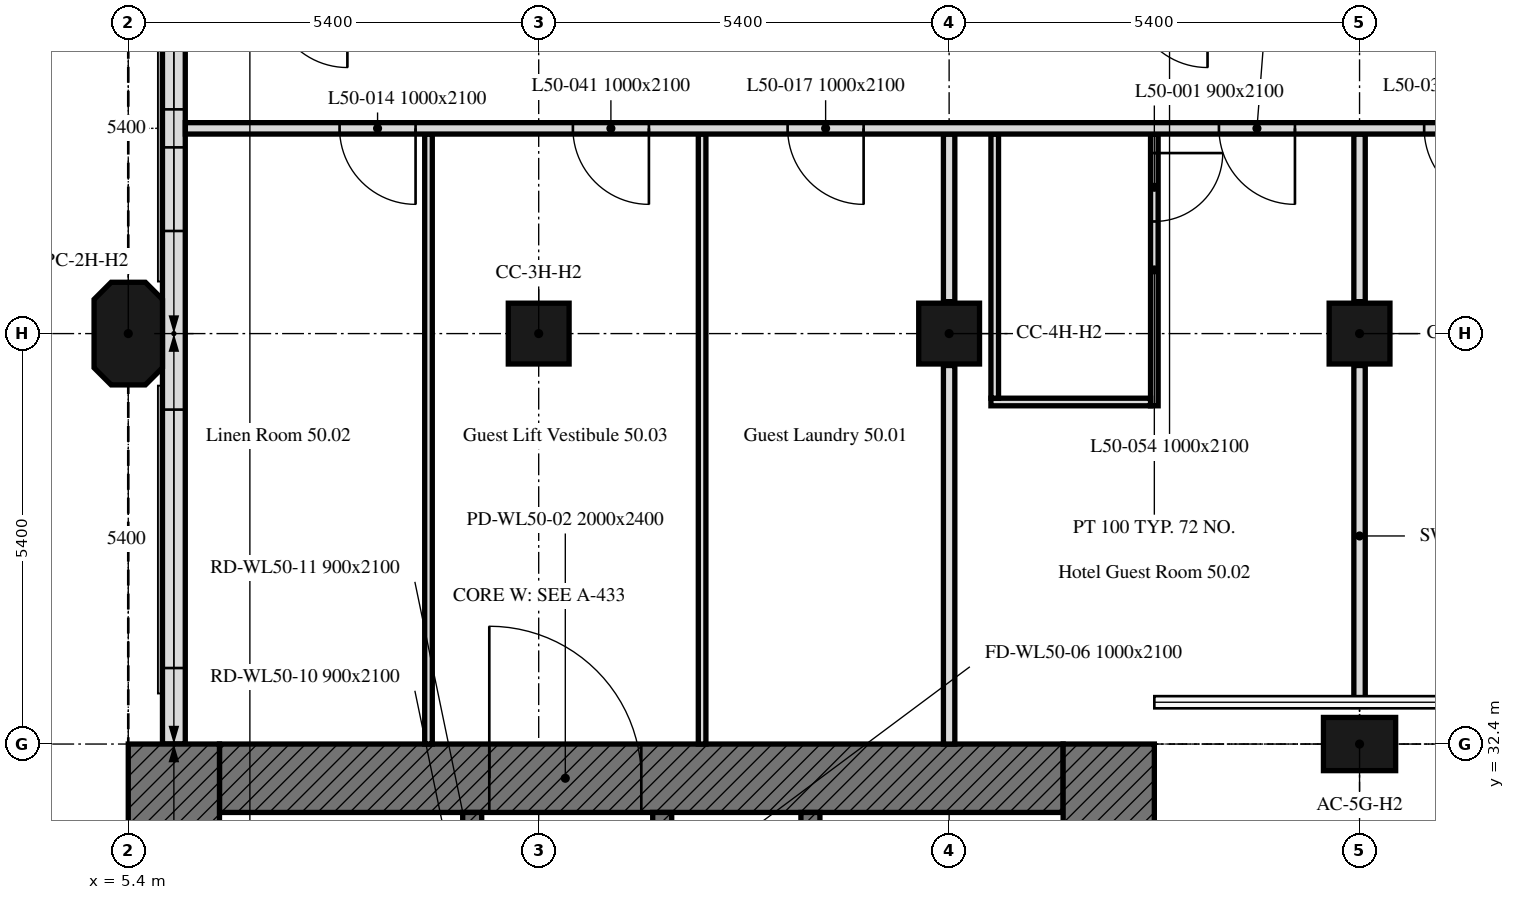
"""IFC4 building model, lengths in metres.
Left out: names, types, materials, properties, quantities, classifications, styles, units other than length and angle.
Written with IfcOpenShell. Run it as: python <this file> out.ifc"""

import sys

from ifc_helpers import new_model, si_unit, direction, frame, frame_2d, origin, origin_2d, place, context, subcontext, project, spatial, polyline, rectangle, outline, extrude, element, fill, save


model = new_model("IFC4")
c1 = context("Model", 3, precision=1e-05, world=origin(), true_north=direction((0.0, 1.0)))
c2 = subcontext(c1, "Body", "Model", "MODEL_VIEW")
j1 = project(units=[si_unit("LENGTHUNIT", "METRE"), si_unit("PLANEANGLEUNIT", "RADIAN")], contexts=[c1])
p1 = place(None, origin())
s1 = spatial("IfcSite", under=j1, at=p1, CompositionType="ELEMENT")
p2 = place(p1, origin())
s2 = spatial("IfcBuilding", under=s1, at=p2, CompositionType="ELEMENT")
p3 = place(p2, frame((0.0, 0.0, 203.8)))
s3 = spatial("IfcBuildingStorey", under=s2, at=p3, CompositionType="ELEMENT", Elevation=203.8)
p4 = place(p3, frame((21.6, 32.4, 0.0), z_axis=(0.0, 0.0, 1.0), x_axis=(1.0, 0.0, 0.0)))
e1 = element("IfcColumn", 1, at=p4, inside=s3, PredefinedType="COLUMN", context=c2, shape_type="SweptSolid", body=[
    extrude(rectangle(XDim=0.95, YDim=0.7, at=origin_2d()), origin(), (0.0, 0.0, 1.0), 3.0),
])
p5 = place(p3, frame((5.4, 37.8, 0.0), z_axis=(0.0, 0.0, 1.0), x_axis=(0.0, 1.0, 0.0)))
e2 = element("IfcColumn", 2, at=p5, inside=s3, PredefinedType="COLUMN", context=c2, shape_type="SweptSolid", body=[
    extrude(outline(polyline([(-0.45, -0.45), (0.45, -0.45), (0.675, -0.225), (0.675, 0.225), (0.45, 0.45), (-0.45, 0.45), (-0.675, 0.225), (-0.675, -0.225), (-0.45, -0.45)])), origin(), (0.0, 0.0, 1.0), 3.0),
])
for number, where, z_axis, x_axis in (
    (3, (10.8, 37.8, 0.0), (0.0, 0.0, 1.0), (1.0, 0.0, 0.0)),
    (4, (16.2, 37.8, 0.0), (0.0, 0.0, 1.0), (1.0, 0.0, 0.0)),
    (5, (21.6, 37.8, 0.0), (0.0, 0.0, 1.0), (1.0, 0.0, 0.0)),
):
    element("IfcColumn", number, at=place(p3, frame(where, z_axis=z_axis, x_axis=x_axis)), inside=s3, PredefinedType="COLUMN", context=c2, shape_type="SweptSolid", body=[
        extrude(rectangle(XDim=0.8, YDim=0.8, at=origin_2d()), origin(), (0.0, 0.0, 1.0), 3.0),
    ])
p6 = place(p3, frame((6.0, 43.014, 0.0), z_axis=(0.0, 0.0, 1.0), x_axis=(0.0, -1.0, 0.0)))
e6 = element("IfcWall", 6, at=p6, inside=s3, PredefinedType="SOLIDWALL", context=c2, shape_type="SweptSolid", body=[
    extrude(rectangle(XDim=10.614, YDim=0.3, at=frame_2d((5.307, 0.0))), origin(), (0.0, 0.0, 1.0), 3.0),
])
p7 = place(p6, frame((1.164, 0.0, 0.9)))
e7 = element("IfcOpeningElement", 7, at=p7, cuts=e6, PredefinedType="OPENING", context=c2, shape_type="SweptSolid", body=[
    extrude(rectangle(XDim=1.1, YDim=1.7, at=frame_2d((0.55, 0.85))), frame((0.0, 0.16, 0.0), z_axis=(0.0, -1.0, 0.0), x_axis=(1.0, 0.0, 0.0)), (0.0, 0.0, 1.0), 0.32),
])
p8 = place(p6, frame((2.764, 0.0, 0.9)))
e8 = element("IfcOpeningElement", 8, at=p8, cuts=e6, PredefinedType="OPENING", context=c2, shape_type="SweptSolid", body=[
    extrude(rectangle(XDim=1.1, YDim=1.7, at=frame_2d((0.55, 0.85))), frame((0.0, 0.16, 0.0), z_axis=(0.0, -1.0, 0.0), x_axis=(1.0, 0.0, 0.0)), (0.0, 0.0, 1.0), 0.32),
])
p9 = place(p6, frame((6.214, 0.0, 0.9)))
e9 = element("IfcOpeningElement", 9, at=p9, cuts=e6, PredefinedType="OPENING", context=c2, shape_type="SweptSolid", body=[
    extrude(rectangle(XDim=3.4, YDim=1.7, at=frame_2d((1.7, 0.85))), frame((0.0, 0.16, 0.0), z_axis=(0.0, -1.0, 0.0), x_axis=(1.0, 0.0, 0.0)), (0.0, 0.0, 1.0), 0.32),
])
p10 = place(p3, frame((6.6, 31.95, 0.0), z_axis=(0.0, 0.0, 1.0), x_axis=(1.0, 0.0, 0.0)))
e10 = element("IfcWall", 10, at=p10, inside=s3, PredefinedType="SOLIDWALL", context=c2, shape_type="SweptSolid", body=[
    extrude(rectangle(XDim=11.1, YDim=0.9, at=frame_2d((5.55, 0.0))), origin(), (0.0, 0.0, 1.0), 3.0),
])
p11 = place(p10, frame((3.55, 0.0, 0.0)))
e11 = element("IfcOpeningElement", 11, at=p11, cuts=e10, PredefinedType="OPENING", context=c2, shape_type="SweptSolid", body=[
    extrude(rectangle(XDim=2.0, YDim=2.4, at=frame_2d((1.0, 1.2))), frame((0.0, 0.45, 0.0), z_axis=(0.0, -1.0, 0.0), x_axis=(1.0, 0.0, 0.0)), (0.0, 0.0, 1.0), 0.9),
])
for number, where, z_axis, x_axis in (
    (12, (6.0, 16.2, 0.0), (0.0, 0.0, 1.0), (0.0, 1.0, 0.0)),
    (13, (18.3, 32.4, 0.0), (0.0, 0.0, 1.0), (0.0, -1.0, 0.0)),
):
    element("IfcWall", number, at=place(p3, frame(where, z_axis=z_axis, x_axis=x_axis)), inside=s3, PredefinedType="SOLIDWALL", context=c2, shape_type="SweptSolid", body=[
        extrude(rectangle(XDim=16.2, YDim=1.2, at=frame_2d((8.1, 0.0))), origin(), (0.0, 0.0, 1.0), 3.0),
    ])
p12 = place(p3, frame((9.925, 17.1, 0.0), z_axis=(0.0, 0.0, 1.0), x_axis=(0.0, 1.0, 0.0)))
e14 = element("IfcWall", 14, at=p12, inside=s3, PredefinedType="SOLIDWALL", context=c2, shape_type="SweptSolid", body=[
    extrude(rectangle(XDim=14.4, YDim=0.25, at=frame_2d((7.2, 0.0))), origin(), (0.0, 0.0, 1.0), 3.0),
])
p13 = place(p12, frame((4.6, 0.0, 0.0)))
e15 = element("IfcOpeningElement", 15, at=p13, cuts=e14, PredefinedType="OPENING", context=c2, shape_type="SweptSolid", body=[
    extrude(rectangle(XDim=1.0, YDim=2.1, at=frame_2d((0.5, 1.05))), frame((0.0, 0.125, 0.0), z_axis=(0.0, -1.0, 0.0), x_axis=(1.0, 0.0, 0.0)), (0.0, 0.0, 1.0), 0.25),
])
p14 = place(p12, frame((7.062, 0.0, 0.0)))
e16 = element("IfcOpeningElement", 16, at=p14, cuts=e14, PredefinedType="OPENING", context=c2, shape_type="SweptSolid", body=[
    extrude(rectangle(XDim=1.2, YDim=2.1, at=frame_2d((0.6, 1.05))), frame((0.0, 0.125, 0.0), z_axis=(0.0, -1.0, 0.0), x_axis=(1.0, 0.0, 0.0)), (0.0, 0.0, 1.0), 0.25),
])
p15 = place(p12, frame((9.979, 0.0, 0.0)))
e17 = element("IfcOpeningElement", 17, at=p15, cuts=e14, PredefinedType="OPENING", context=c2, shape_type="SweptSolid", body=[
    extrude(rectangle(XDim=0.9, YDim=2.1, at=frame_2d((0.45, 1.05))), frame((0.0, 0.125, 0.0), z_axis=(0.0, -1.0, 0.0), x_axis=(1.0, 0.0, 0.0)), (0.0, 0.0, 1.0), 0.25),
])
p16 = place(p12, frame((11.92, 0.0, 0.0)))
e18 = element("IfcOpeningElement", 18, at=p16, cuts=e14, PredefinedType="OPENING", context=c2, shape_type="SweptSolid", body=[
    extrude(rectangle(XDim=0.9, YDim=2.1, at=frame_2d((0.45, 1.05))), frame((0.0, 0.125, 0.0), z_axis=(0.0, -1.0, 0.0), x_axis=(1.0, 0.0, 0.0)), (0.0, 0.0, 1.0), 0.25),
])
p17 = place(p12, frame((13.354, 0.0, 0.0)))
e19 = element("IfcOpeningElement", 19, at=p17, cuts=e14, PredefinedType="OPENING", context=c2, shape_type="SweptSolid", body=[
    extrude(rectangle(XDim=0.9, YDim=2.1, at=frame_2d((0.45, 1.05))), frame((0.0, 0.125, 0.0), z_axis=(0.0, -1.0, 0.0), x_axis=(1.0, 0.0, 0.0)), (0.0, 0.0, 1.0), 0.25),
])
p18 = place(p3, frame((14.375, 17.1, 0.0), z_axis=(0.0, 0.0, 1.0), x_axis=(0.0, 1.0, 0.0)))
e20 = element("IfcWall", 20, at=p18, inside=s3, PredefinedType="SOLIDWALL", context=c2, shape_type="SweptSolid", body=[
    extrude(rectangle(XDim=14.4, YDim=0.25, at=frame_2d((7.2, 0.0))), origin(), (0.0, 0.0, 1.0), 3.0),
])
p19 = place(p18, frame((13.15, 0.0, 0.0)))
e21 = element("IfcOpeningElement", 21, at=p19, cuts=e20, PredefinedType="OPENING", context=c2, shape_type="SweptSolid", body=[
    extrude(rectangle(XDim=1.0, YDim=2.1, at=frame_2d((0.5, 1.05))), frame((0.0, 0.125, 0.0), z_axis=(0.0, -1.0, 0.0), x_axis=(1.0, 0.0, 0.0)), (0.0, 0.0, 1.0), 0.25),
])
p20 = place(p18, frame((0.6, 0.0, 0.0)))
e22 = element("IfcOpeningElement", 22, at=p20, cuts=e20, PredefinedType="OPENING", context=c2, shape_type="SweptSolid", body=[
    extrude(rectangle(XDim=1.1, YDim=2.1, at=frame_2d((0.55, 1.05))), frame((0.0, 0.125, 0.0), z_axis=(0.0, -1.0, 0.0), x_axis=(1.0, 0.0, 0.0)), (0.0, 0.0, 1.0), 0.25),
])
p21 = place(p18, frame((3.25, 0.0, 0.0)))
e23 = element("IfcOpeningElement", 23, at=p21, cuts=e20, PredefinedType="OPENING", context=c2, shape_type="SweptSolid", body=[
    extrude(rectangle(XDim=0.9, YDim=2.1, at=frame_2d((0.45, 1.05))), frame((0.0, 0.125, 0.0), z_axis=(0.0, -1.0, 0.0), x_axis=(1.0, 0.0, 0.0)), (0.0, 0.0, 1.0), 0.25),
])
p22 = place(p3, frame((12.425, 29.4, 0.0), z_axis=(0.0, 0.0, 1.0), x_axis=(0.0, 1.0, 0.0)))
e24 = element("IfcWall", 24, at=p22, inside=s3, PredefinedType="SOLIDWALL", context=c2, shape_type="SweptSolid", body=[
    extrude(rectangle(XDim=2.1, YDim=0.25, at=frame_2d((1.05, 0.0))), origin(), (0.0, 0.0, 1.0), 3.0),
])
p23 = place(p22, frame((0.5, 0.0, 0.0)))
e25 = element("IfcOpeningElement", 25, at=p23, cuts=e24, PredefinedType="OPENING", context=c2, shape_type="SweptSolid", body=[
    extrude(rectangle(XDim=1.0, YDim=2.1, at=frame_2d((0.5, 1.05))), frame((0.0, 0.125, 0.0), z_axis=(0.0, -1.0, 0.0), x_axis=(1.0, 0.0, 0.0)), (0.0, 0.0, 1.0), 0.25),
])
p24 = place(p3, frame((21.6, 32.895, 0.0), z_axis=(0.0, 0.0, 1.0), x_axis=(0.0, 1.0, 0.0)))
e26 = element("IfcWall", 26, at=p24, inside=s3, PredefinedType="PARTITIONING", context=c2, shape_type="SweptSolid", body=[
    extrude(rectangle(XDim=4.485, YDim=0.15, at=frame_2d((2.242, 0.0))), origin(), (0.0, 0.0, 1.0), 2.4),
])
p25 = place(p3, frame((21.6, 38.22, 0.0), z_axis=(0.0, 0.0, 1.0), x_axis=(0.0, 1.0, 0.0)))
e27 = element("IfcWall", 27, at=p25, inside=s3, PredefinedType="PARTITIONING", context=c2, shape_type="SweptSolid", body=[
    extrude(rectangle(XDim=2.205, YDim=0.15, at=frame_2d((1.103, 0.0))), origin(), (0.0, 0.0, 1.0), 2.4),
])
p26 = place(p3, frame((18.9, 40.425, 0.0), z_axis=(0.0, 0.0, 1.0), x_axis=(0.0, -1.0, 0.0)))
e28 = element("IfcWall", 28, at=p26, inside=s3, PredefinedType="PARTITIONING", context=c2, shape_type="SweptSolid", body=[
    extrude(rectangle(XDim=3.575, YDim=0.1, at=frame_2d((1.788, 0.0))), origin(), (0.0, 0.0, 1.0), 3.0),
])
p27 = place(p26, frame((0.25, 0.0, 0.0)))
e29 = element("IfcOpeningElement", 29, at=p27, cuts=e28, PredefinedType="OPENING", context=c2, shape_type="SweptSolid", body=[
    extrude(rectangle(XDim=0.9, YDim=2.1, at=frame_2d((0.45, 1.05))), frame((0.0, 0.05, 0.0), z_axis=(0.0, -1.0, 0.0), x_axis=(1.0, 0.0, 0.0)), (0.0, 0.0, 1.0), 0.1),
])
p28 = place(p3, frame((18.85, 36.9, 0.0), z_axis=(0.0, 0.0, 1.0), x_axis=(-1.0, 0.0, 0.0)))
e30 = element("IfcWall", 30, at=p28, inside=s3, PredefinedType="PARTITIONING", context=c2, shape_type="SweptSolid", body=[
    extrude(rectangle(XDim=2.1, YDim=0.1, at=frame_2d((1.05, 0.0))), origin(), (0.0, 0.0, 1.0), 3.0),
])
p29 = place(p3, frame((16.8, 36.95, 0.0), z_axis=(0.0, 0.0, 1.0), x_axis=(0.0, 1.0, 0.0)))
e31 = element("IfcWall", 31, at=p29, inside=s3, PredefinedType="PARTITIONING", context=c2, shape_type="SweptSolid", body=[
    extrude(rectangle(XDim=3.475, YDim=0.1, at=frame_2d((1.738, 0.0))), origin(), (0.0, 0.0, 1.0), 3.0),
])
p30 = place(p3, frame((16.2, 40.425, 0.0), z_axis=(0.0, 0.0, 1.0), x_axis=(0.0, -1.0, 0.0)))
e32 = element("IfcWall", 32, at=p30, inside=s3, PredefinedType="PARTITIONING", context=c2, shape_type="SweptSolid", body=[
    extrude(rectangle(XDim=2.205, YDim=0.15, at=frame_2d((1.103, 0.0))), origin(), (0.0, 0.0, 1.0), 2.4),
])
p31 = place(p3, frame((16.2, 37.38, 0.0), z_axis=(0.0, 0.0, 1.0), x_axis=(0.0, -1.0, 0.0)))
e33 = element("IfcWall", 33, at=p31, inside=s3, PredefinedType="PARTITIONING", context=c2, shape_type="SweptSolid", body=[
    extrude(rectangle(XDim=4.98, YDim=0.15, at=frame_2d((2.49, 0.0))), origin(), (0.0, 0.0, 1.0), 2.4),
])
for number, where, z_axis, x_axis in (
    (34, (9.35, 40.425, 0.0), (0.0, 0.0, 1.0), (0.0, -1.0, 0.0)),
    (35, (12.95, 32.4, 0.0), (0.0, 0.0, 1.0), (0.0, 1.0, 0.0)),
):
    element("IfcWall", number, at=place(p3, frame(where, z_axis=z_axis, x_axis=x_axis)), inside=s3, PredefinedType="PARTITIONING", context=c2, shape_type="SweptSolid", body=[
        extrude(rectangle(XDim=8.025, YDim=0.1, at=frame_2d((4.013, 0.0))), origin(), (0.0, 0.0, 1.0), 2.4),
    ])
p32 = place(p3, frame((32.3, 40.5, 0.0), z_axis=(0.0, 0.0, 1.0), x_axis=(-1.0, 0.0, 0.0)))
e36 = element("IfcWall", 36, at=p32, inside=s3, PredefinedType="PARTITIONING", context=c2, shape_type="SweptSolid", body=[
    extrude(rectangle(XDim=26.149, YDim=0.15, at=frame_2d((13.075, 0.0))), origin(), (0.0, 0.0, 1.0), 2.4),
])
p33 = place(p32, frame((23.12, 0.0, 0.0)))
e37 = element("IfcOpeningElement", 37, at=p33, cuts=e36, PredefinedType="OPENING", context=c2, shape_type="SweptSolid", body=[
    extrude(rectangle(XDim=1.0, YDim=2.1, at=frame_2d((0.5, 1.05))), frame((0.0, 0.075, 0.0), z_axis=(0.0, -1.0, 0.0), x_axis=(1.0, 0.0, 0.0)), (0.0, 0.0, 1.0), 0.15),
])
p34 = place(p32, frame((17.225, 0.0, 0.0)))
e38 = element("IfcOpeningElement", 38, at=p34, cuts=e36, PredefinedType="OPENING", context=c2, shape_type="SweptSolid", body=[
    extrude(rectangle(XDim=1.0, YDim=2.1, at=frame_2d((0.5, 1.05))), frame((0.0, 0.075, 0.0), z_axis=(0.0, -1.0, 0.0), x_axis=(1.0, 0.0, 0.0)), (0.0, 0.0, 1.0), 0.15),
])
p35 = place(p32, frame((11.55, 0.0, 0.0)))
e39 = element("IfcOpeningElement", 39, at=p35, cuts=e36, PredefinedType="OPENING", context=c2, shape_type="SweptSolid", body=[
    extrude(rectangle(XDim=1.0, YDim=2.1, at=frame_2d((0.5, 1.05))), frame((0.0, 0.075, 0.0), z_axis=(0.0, -1.0, 0.0), x_axis=(1.0, 0.0, 0.0)), (0.0, 0.0, 1.0), 0.15),
])
p36 = place(p32, frame((8.85, 0.0, 0.0)))
e40 = element("IfcOpeningElement", 40, at=p36, cuts=e36, PredefinedType="OPENING", context=c2, shape_type="SweptSolid", body=[
    extrude(rectangle(XDim=1.0, YDim=2.1, at=frame_2d((0.5, 1.05))), frame((0.0, 0.075, 0.0), z_axis=(0.0, -1.0, 0.0), x_axis=(1.0, 0.0, 0.0)), (0.0, 0.0, 1.0), 0.15),
])
p37 = place(p32, frame((0.75, 0.0, 0.0)))
e41 = element("IfcOpeningElement", 41, at=p37, cuts=e36, PredefinedType="OPENING", context=c2, shape_type="SweptSolid", body=[
    extrude(rectangle(XDim=1.0, YDim=2.1, at=frame_2d((0.5, 1.05))), frame((0.0, 0.075, 0.0), z_axis=(0.0, -1.0, 0.0), x_axis=(1.0, 0.0, 0.0)), (0.0, 0.0, 1.0), 0.15),
])
p38 = place(p32, frame((20.05, 0.0, 0.0)))
e42 = element("IfcOpeningElement", 42, at=p38, cuts=e36, PredefinedType="OPENING", context=c2, shape_type="SweptSolid", body=[
    extrude(rectangle(XDim=1.0, YDim=2.1, at=frame_2d((0.5, 1.05))), frame((0.0, 0.075, 0.0), z_axis=(0.0, -1.0, 0.0), x_axis=(1.0, 0.0, 0.0)), (0.0, 0.0, 1.0), 0.15),
])
p39 = place(p7, origin())
e43 = element("IfcWindow", 43, at=p39, inside=s3, PartitioningType="SINGLE_PANEL", PredefinedType="WINDOW", context=c2, shape_type="SweptSolid", body=[
    extrude(rectangle(XDim=1.1, YDim=1.7, at=frame_2d((0.55, 0.85))), frame((0.0, 0.03, 0.0), z_axis=(0.0, -1.0, 0.0), x_axis=(1.0, 0.0, 0.0)), (0.0, 0.0, 1.0), 0.06),
])
fill(e7, e43)
p40 = place(p8, origin())
e44 = element("IfcWindow", 44, at=p40, inside=s3, PartitioningType="SINGLE_PANEL", PredefinedType="WINDOW", context=c2, shape_type="SweptSolid", body=[
    extrude(rectangle(XDim=1.1, YDim=1.7, at=frame_2d((0.55, 0.85))), frame((0.0, 0.03, 0.0), z_axis=(0.0, -1.0, 0.0), x_axis=(1.0, 0.0, 0.0)), (0.0, 0.0, 1.0), 0.06),
])
fill(e8, e44)
p41 = place(p9, origin())
e45 = element("IfcWindow", 45, at=p41, inside=s3, PartitioningType="SINGLE_PANEL", PredefinedType="WINDOW", context=c2, shape_type="SweptSolid", body=[
    extrude(rectangle(XDim=3.4, YDim=1.7, at=frame_2d((1.7, 0.85))), frame((0.0, 0.03, 0.0), z_axis=(0.0, -1.0, 0.0), x_axis=(1.0, 0.0, 0.0)), (0.0, 0.0, 1.0), 0.06),
])
fill(e9, e45)
p42 = place(p11, origin())
e46 = element("IfcDoor", 46, at=p42, inside=s3, OperationType="DOUBLE_DOOR_SINGLE_SWING", PredefinedType="DOOR", context=c2, shape_type="SweptSolid", body=[
    extrude(rectangle(XDim=2.0, YDim=2.4, at=frame_2d((1.0, 1.2))), frame((0.0, 0.025, 0.0), z_axis=(0.0, -1.0, 0.0), x_axis=(1.0, 0.0, 0.0)), (0.0, 0.0, 1.0), 0.05),
])
fill(e11, e46)
p43 = place(p27, origin())
e47 = element("IfcDoor", 47, at=p43, inside=s3, OperationType="SINGLE_SWING_RIGHT", PredefinedType="DOOR", context=c2, shape_type="SweptSolid", body=[
    extrude(rectangle(XDim=0.9, YDim=2.1, at=frame_2d((0.45, 1.05))), frame((0.0, 0.025, 0.0), z_axis=(0.0, -1.0, 0.0), x_axis=(1.0, 0.0, 0.0)), (0.0, 0.0, 1.0), 0.05),
])
fill(e29, e47)
p44 = place(p33, origin())
e48 = element("IfcDoor", 48, at=p44, inside=s3, OperationType="SINGLE_SWING_LEFT", PredefinedType="DOOR", context=c2, shape_type="SweptSolid", body=[
    extrude(rectangle(XDim=1.0, YDim=2.1, at=frame_2d((0.5, 1.05))), frame((0.0, 0.025, 0.0), z_axis=(0.0, -1.0, 0.0), x_axis=(1.0, 0.0, 0.0)), (0.0, 0.0, 1.0), 0.05),
])
fill(e37, e48)
p45 = place(p34, origin())
e49 = element("IfcDoor", 49, at=p45, inside=s3, OperationType="SINGLE_SWING_RIGHT", PredefinedType="DOOR", context=c2, shape_type="SweptSolid", body=[
    extrude(rectangle(XDim=1.0, YDim=2.1, at=frame_2d((0.5, 1.05))), frame((0.0, 0.025, 0.0), z_axis=(0.0, -1.0, 0.0), x_axis=(1.0, 0.0, 0.0)), (0.0, 0.0, 1.0), 0.05),
])
fill(e38, e49)
p46 = place(p35, origin())
e50 = element("IfcDoor", 50, at=p46, inside=s3, OperationType="SINGLE_SWING_RIGHT", PredefinedType="DOOR", context=c2, shape_type="SweptSolid", body=[
    extrude(rectangle(XDim=1.0, YDim=2.1, at=frame_2d((0.5, 1.05))), frame((0.0, 0.025, 0.0), z_axis=(0.0, -1.0, 0.0), x_axis=(1.0, 0.0, 0.0)), (0.0, 0.0, 1.0), 0.05),
])
fill(e39, e50)
p47 = place(p36, origin())
e51 = element("IfcDoor", 51, at=p47, inside=s3, OperationType="SINGLE_SWING_LEFT", PredefinedType="DOOR", context=c2, shape_type="SweptSolid", body=[
    extrude(rectangle(XDim=1.0, YDim=2.1, at=frame_2d((0.5, 1.05))), frame((0.0, 0.025, 0.0), z_axis=(0.0, -1.0, 0.0), x_axis=(1.0, 0.0, 0.0)), (0.0, 0.0, 1.0), 0.05),
])
fill(e40, e51)
p48 = place(p38, origin())
e52 = element("IfcDoor", 52, at=p48, inside=s3, OperationType="SINGLE_SWING_RIGHT", PredefinedType="DOOR", context=c2, shape_type="SweptSolid", body=[
    extrude(rectangle(XDim=1.0, YDim=2.1, at=frame_2d((0.5, 1.05))), frame((0.0, 0.025, 0.0), z_axis=(0.0, -1.0, 0.0), x_axis=(1.0, 0.0, 0.0)), (0.0, 0.0, 1.0), 0.05),
])
fill(e42, e52)
save(model, sys.argv[1])
